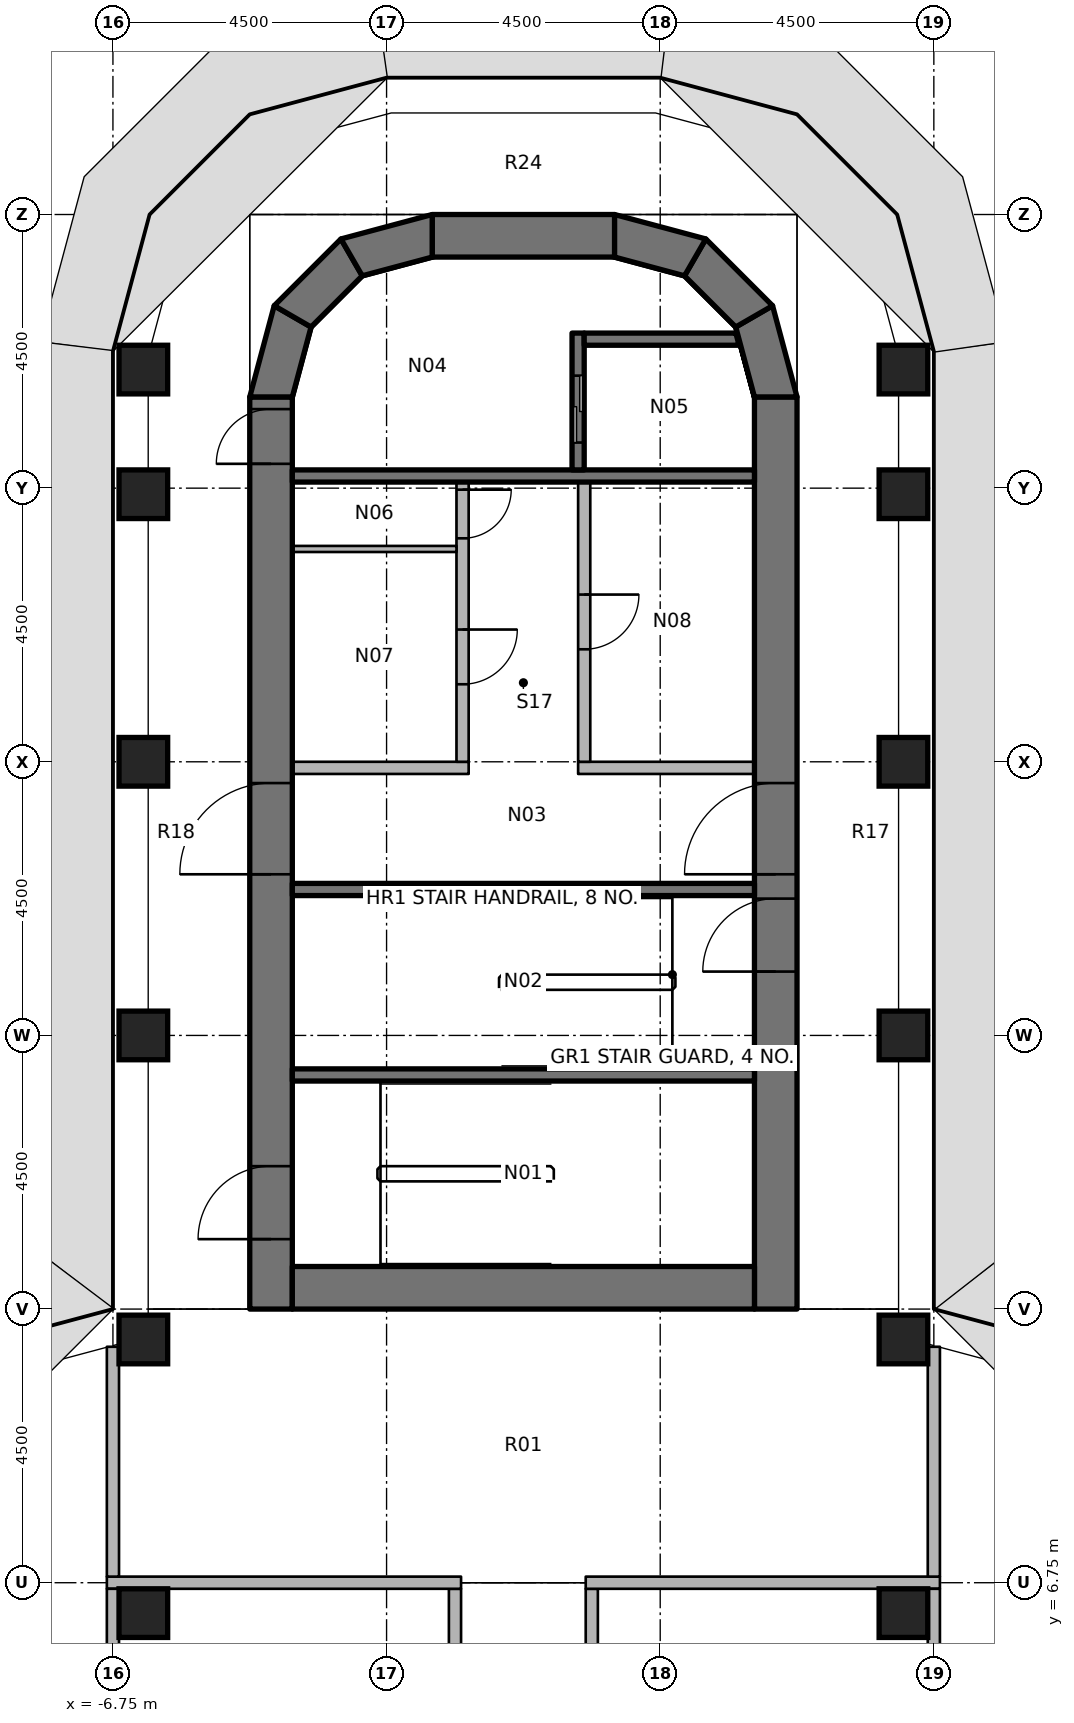
"""IFC4 building model, lengths in metres.
Left out: names, types, materials, properties, quantities, classifications, styles, units other than length and angle.
Written with IfcOpenShell. Run it as: python <this file> out.ifc"""

import sys

from ifc_helpers import new_model, si_unit, direction, frame, frame_2d, origin, origin_2d, place, context, subcontext, project, spatial, polyline, rectangle, outline, extrude, element, fill, save


model = new_model("IFC4")
c1 = context("Model", 3, precision=1e-05, world=origin(), true_north=direction((0.0, 1.0)))
c2 = subcontext(c1, "Body", "Model", "MODEL_VIEW")
j1 = project(units=[si_unit("LENGTHUNIT", "METRE"), si_unit("PLANEANGLEUNIT", "RADIAN")], contexts=[c1])
p1 = place(None, origin())
s1 = spatial("IfcSite", under=j1, at=p1, CompositionType="ELEMENT")
p2 = place(p1, origin())
s2 = spatial("IfcBuilding", under=s1, at=p2, CompositionType="ELEMENT")
p3 = place(p2, frame((0.0, 0.0, 171.4)))
s3 = spatial("IfcBuildingStorey", under=s2, at=p3, CompositionType="ELEMENT", Elevation=171.4)
for number, where, z_axis, x_axis in (
    (1, (-6.25, 6.25, 0.0), (0.0, 0.0, 1.0), (1.0, 0.0, 0.0)),
    (2, (-6.25, 10.75, 0.0), (0.0, 0.0, 1.0), (1.0, 0.0, 0.0)),
    (3, (-6.25, 15.75, 0.0), (0.0, 0.0, 1.0), (1.0, 0.0, 0.0)),
    (4, (-6.25, 20.25, 0.0), (0.0, 0.0, 1.0), (1.0, 0.0, 0.0)),
    (5, (-6.25, 24.65, 0.0), (0.0, 0.0, 1.0), (1.0, 0.0, 0.0)),
    (6, (-6.25, 26.7, 0.0), (0.0, 0.0, 1.0), (1.0, 0.0, 0.0)),
    (7, (6.25, 6.25, 0.0), (0.0, 0.0, 1.0), (1.0, 0.0, 0.0)),
    (8, (6.25, 10.75, 0.0), (0.0, 0.0, 1.0), (1.0, 0.0, 0.0)),
    (9, (6.25, 15.75, 0.0), (0.0, 0.0, 1.0), (1.0, 0.0, 0.0)),
    (10, (6.25, 20.25, 0.0), (0.0, 0.0, 1.0), (1.0, 0.0, 0.0)),
    (11, (6.25, 24.65, 0.0), (0.0, 0.0, 1.0), (1.0, 0.0, 0.0)),
    (12, (6.25, 26.7, 0.0), (0.0, 0.0, 1.0), (1.0, 0.0, 0.0)),
):
    element("IfcColumn", number, at=place(p3, frame(where, z_axis=z_axis, x_axis=x_axis)), inside=s3, PredefinedType="COLUMN", context=c2, shape_type="SweptSolid", body=[
        extrude(rectangle(XDim=0.8, YDim=0.8, at=origin_2d()), origin(), (0.0, 0.0, 1.0), 3.65),
    ])
p4 = place(p3, frame((-4.15, 11.25, 0.0), z_axis=(0.0, 0.0, 1.0), x_axis=(0.0, 1.0, 0.0)))
e13 = element("IfcWall", 13, at=p4, inside=s3, PredefinedType="SHEAR", context=c2, shape_type="SweptSolid", body=[
    extrude(rectangle(XDim=15.0, YDim=0.7, at=frame_2d((7.5, 0.0))), origin(), (0.0, 0.0, 1.0), 3.8),
])
p5 = place(p4, frame((7.15, 0.0, 0.0)))
e14 = element("IfcOpeningElement", 14, at=p5, cuts=e13, PredefinedType="OPENING", context=c2, shape_type="SweptSolid", body=[
    extrude(rectangle(XDim=1.5, YDim=2.3, at=frame_2d((0.75, 1.15))), frame((0.0, 0.36, 0.0), z_axis=(0.0, -1.0, 0.0), x_axis=(1.0, 0.0, 0.0)), (0.0, 0.0, 1.0), 0.72),
])
p6 = place(p4, frame((13.9, 0.0, 0.0)))
e15 = element("IfcOpeningElement", 15, at=p6, cuts=e13, PredefinedType="OPENING", context=c2, shape_type="SweptSolid", body=[
    extrude(rectangle(XDim=0.9, YDim=2.1, at=frame_2d((0.45, 1.05))), frame((0.0, 0.36, 0.0), z_axis=(0.0, -1.0, 0.0), x_axis=(1.0, 0.0, 0.0)), (0.0, 0.0, 1.0), 0.72),
])
p7 = place(p4, frame((1.15, 0.0, 0.0)))
e16 = element("IfcOpeningElement", 16, at=p7, cuts=e13, PredefinedType="OPENING", context=c2, shape_type="SweptSolid", body=[
    extrude(rectangle(XDim=1.2, YDim=2.1, at=frame_2d((0.6, 1.05))), frame((0.0, 0.36, 0.0), z_axis=(0.0, -1.0, 0.0), x_axis=(1.0, 0.0, 0.0)), (0.0, 0.0, 1.0), 0.72),
])
p8 = place(p3, frame((4.15, 11.25, 0.0), z_axis=(0.0, 0.0, 1.0), x_axis=(0.0, 1.0, 0.0)))
e17 = element("IfcWall", 17, at=p8, inside=s3, PredefinedType="SHEAR", context=c2, shape_type="SweptSolid", body=[
    extrude(rectangle(XDim=15.0, YDim=0.7, at=frame_2d((7.5, 0.0))), origin(), (0.0, 0.0, 1.0), 3.8),
])
p9 = place(p8, frame((7.15, 0.0, 0.0)))
e18 = element("IfcOpeningElement", 18, at=p9, cuts=e17, PredefinedType="OPENING", context=c2, shape_type="SweptSolid", body=[
    extrude(rectangle(XDim=1.5, YDim=2.3, at=frame_2d((0.75, 1.15))), frame((0.0, 0.36, 0.0), z_axis=(0.0, -1.0, 0.0), x_axis=(1.0, 0.0, 0.0)), (0.0, 0.0, 1.0), 0.72),
])
p10 = place(p8, frame((5.55, 0.0, 0.0)))
e19 = element("IfcOpeningElement", 19, at=p10, cuts=e17, PredefinedType="OPENING", context=c2, shape_type="SweptSolid", body=[
    extrude(rectangle(XDim=1.2, YDim=2.1, at=frame_2d((0.6, 1.05))), frame((0.0, 0.36, 0.0), z_axis=(0.0, -1.0, 0.0), x_axis=(1.0, 0.0, 0.0)), (0.0, 0.0, 1.0), 0.72),
])
p11 = place(p3, frame((-3.8, 11.6, 0.0), z_axis=(0.0, 0.0, 1.0), x_axis=(1.0, 0.0, 0.0)))
e20 = element("IfcWall", 20, at=p11, inside=s3, PredefinedType="SHEAR", context=c2, shape_type="SweptSolid", body=[
    extrude(rectangle(XDim=7.6, YDim=0.7, at=frame_2d((3.8, 0.0))), origin(), (0.0, 0.0, 1.0), 3.8),
])
p12 = place(p3, frame((-1.5, 28.9, 0.0), z_axis=(0.0, 0.0, 1.0), x_axis=(1.0, 0.0, 0.0)))
e21 = element("IfcWall", 21, at=p12, inside=s3, PredefinedType="SHEAR", context=c2, shape_type="SweptSolid", body=[
    extrude(rectangle(XDim=3.0, YDim=0.7, at=frame_2d((1.5, 0.0))), origin(), (0.0, 0.0, 1.0), 3.8),
])
p13 = place(p3, origin())
e22 = element("IfcWall", 22, at=p13, inside=s3, PredefinedType="SHEAR", context=c2, shape_type="SweptSolid", body=[
    extrude(outline(polyline([(-4.5, 26.25), (-4.098, 27.75), (-3.492, 27.4), (-3.8, 26.25), (-4.5, 26.25)])), origin(), (0.0, 0.0, 1.0), 3.8),
])
p14 = place(p3, origin())
e23 = element("IfcWall", 23, at=p14, inside=s3, PredefinedType="SHEAR", context=c2, shape_type="SweptSolid", body=[
    extrude(outline(polyline([(-4.098, 27.75), (-3.0, 28.848), (-2.65, 28.242), (-3.492, 27.4), (-4.098, 27.75)])), origin(), (0.0, 0.0, 1.0), 3.8),
])
p15 = place(p3, origin())
e24 = element("IfcWall", 24, at=p15, inside=s3, PredefinedType="SHEAR", context=c2, shape_type="SweptSolid", body=[
    extrude(outline(polyline([(-3.0, 28.848), (-1.5, 29.25), (-1.5, 28.55), (-2.65, 28.242), (-3.0, 28.848)])), origin(), (0.0, 0.0, 1.0), 3.8),
])
p16 = place(p3, origin())
e25 = element("IfcWall", 25, at=p16, inside=s3, PredefinedType="SHEAR", context=c2, shape_type="SweptSolid", body=[
    extrude(outline(polyline([(4.5, 26.25), (4.098, 27.75), (3.492, 27.4), (3.8, 26.25), (4.5, 26.25)])), origin(), (0.0, 0.0, 1.0), 3.8),
])
p17 = place(p3, origin())
e26 = element("IfcWall", 26, at=p17, inside=s3, PredefinedType="SHEAR", context=c2, shape_type="SweptSolid", body=[
    extrude(outline(polyline([(4.098, 27.75), (3.0, 28.848), (2.65, 28.242), (3.492, 27.4), (4.098, 27.75)])), origin(), (0.0, 0.0, 1.0), 3.8),
])
p18 = place(p3, origin())
e27 = element("IfcWall", 27, at=p18, inside=s3, PredefinedType="SHEAR", context=c2, shape_type="SweptSolid", body=[
    extrude(outline(polyline([(3.0, 28.848), (1.5, 29.25), (1.5, 28.55), (2.65, 28.242), (3.0, 28.848)])), origin(), (0.0, 0.0, 1.0), 3.8),
])
p19 = place(p3, frame((-3.8, 24.95, 0.0), z_axis=(0.0, 0.0, 1.0), x_axis=(1.0, 0.0, 0.0)))
e28 = element("IfcWall", 28, at=p19, inside=s3, PredefinedType="SHEAR", context=c2, shape_type="SweptSolid", body=[
    extrude(rectangle(XDim=7.6, YDim=0.2, at=frame_2d((3.8, 0.0))), origin(), (0.0, 0.0, 1.0), 3.65),
])
p20 = place(p3, frame((0.9, 27.3, 0.0), z_axis=(0.0, 0.0, 1.0), x_axis=(0.0, -1.0, 0.0)))
e29 = element("IfcWall", 29, at=p20, inside=s3, PredefinedType="SHEAR", context=c2, shape_type="SweptSolid", body=[
    extrude(rectangle(XDim=2.25, YDim=0.2, at=frame_2d((1.125, 0.0))), origin(), (0.0, 0.0, 1.0), 3.65),
])
p21 = place(p20, frame((0.7, 0.0, 0.0)))
e30 = element("IfcOpeningElement", 30, at=p21, cuts=e29, PredefinedType="OPENING", context=c2, shape_type="SweptSolid", body=[
    extrude(rectangle(XDim=1.1, YDim=2.3, at=frame_2d((0.55, 1.15))), frame((0.0, 0.11, 0.0), z_axis=(0.0, -1.0, 0.0), x_axis=(1.0, 0.0, 0.0)), (0.0, 0.0, 1.0), 0.22),
])
p22 = place(p3, origin())
e31 = element("IfcWall", 31, at=p22, inside=s3, PredefinedType="SHEAR", context=c2, shape_type="SweptSolid", body=[
    extrude(outline(polyline([(1.0, 27.1), (3.548, 27.1), (3.494, 27.3), (1.0, 27.3), (1.0, 27.1)])), origin(), (0.0, 0.0, 1.0), 3.65),
])
for number, where, z_axis, x_axis in (
    (32, (-3.8, 18.15, 0.0), (0.0, 0.0, 1.0), (1.0, 0.0, 0.0)),
    (33, (-3.8, 15.1, 0.0), (0.0, 0.0, 1.0), (1.0, 0.0, 0.0)),
):
    element("IfcWall", number, at=place(p3, frame(where, z_axis=z_axis, x_axis=x_axis)), inside=s3, PredefinedType="SHEAR", context=c2, shape_type="SweptSolid", body=[
        extrude(rectangle(XDim=7.6, YDim=0.2, at=frame_2d((3.8, 0.0))), origin(), (0.0, 0.0, 1.0), 3.65),
    ])
p23 = place(p3, frame((-3.8, 20.15, 0.0), z_axis=(0.0, 0.0, 1.0), x_axis=(1.0, 0.0, 0.0)))
e34 = element("IfcWall", 34, at=p23, inside=s3, PredefinedType="PARTITIONING", context=c2, shape_type="SweptSolid", body=[
    extrude(rectangle(XDim=2.9, YDim=0.2, at=frame_2d((1.45, 0.0))), origin(), (0.0, 0.0, 1.0), 3.65),
])
p24 = place(p3, frame((-1.0, 24.85, 0.0), z_axis=(0.0, 0.0, 1.0), x_axis=(0.0, -1.0, 0.0)))
e35 = element("IfcWall", 35, at=p24, inside=s3, PredefinedType="PARTITIONING", context=c2, shape_type="SweptSolid", body=[
    extrude(rectangle(XDim=4.6, YDim=0.2, at=frame_2d((2.3, 0.0))), origin(), (0.0, 0.0, 1.0), 3.65),
])
p25 = place(p24, frame((0.125, 0.0, 0.0)))
e36 = element("IfcOpeningElement", 36, at=p25, cuts=e35, PredefinedType="OPENING", context=c2, shape_type="SweptSolid", body=[
    extrude(rectangle(XDim=0.8, YDim=2.1, at=frame_2d((0.4, 1.05))), frame((0.0, 0.11, 0.0), z_axis=(0.0, -1.0, 0.0), x_axis=(1.0, 0.0, 0.0)), (0.0, 0.0, 1.0), 0.22),
])
p26 = place(p24, frame((2.425, 0.0, 0.0)))
e37 = element("IfcOpeningElement", 37, at=p26, cuts=e35, PredefinedType="OPENING", context=c2, shape_type="SweptSolid", body=[
    extrude(rectangle(XDim=0.9, YDim=2.1, at=frame_2d((0.45, 1.05))), frame((0.0, 0.11, 0.0), z_axis=(0.0, -1.0, 0.0), x_axis=(1.0, 0.0, 0.0)), (0.0, 0.0, 1.0), 0.22),
])
p27 = place(p3, frame((0.9, 20.15, 0.0), z_axis=(0.0, 0.0, 1.0), x_axis=(1.0, 0.0, 0.0)))
e38 = element("IfcWall", 38, at=p27, inside=s3, PredefinedType="PARTITIONING", context=c2, shape_type="SweptSolid", body=[
    extrude(rectangle(XDim=2.9, YDim=0.2, at=frame_2d((1.45, 0.0))), origin(), (0.0, 0.0, 1.0), 3.65),
])
p28 = place(p3, frame((1.0, 24.85, 0.0), z_axis=(0.0, 0.0, 1.0), x_axis=(0.0, -1.0, 0.0)))
e39 = element("IfcWall", 39, at=p28, inside=s3, PredefinedType="PARTITIONING", context=c2, shape_type="SweptSolid", body=[
    extrude(rectangle(XDim=4.6, YDim=0.2, at=frame_2d((2.3, 0.0))), origin(), (0.0, 0.0, 1.0), 3.65),
])
p29 = place(p28, frame((1.85, 0.0, 0.0)))
e40 = element("IfcOpeningElement", 40, at=p29, cuts=e39, PredefinedType="OPENING", context=c2, shape_type="SweptSolid", body=[
    extrude(rectangle(XDim=0.9, YDim=2.1, at=frame_2d((0.45, 1.05))), frame((0.0, 0.11, 0.0), z_axis=(0.0, -1.0, 0.0), x_axis=(1.0, 0.0, 0.0)), (0.0, 0.0, 1.0), 0.22),
])
p30 = place(p3, frame((-3.8, 23.75, 0.0), z_axis=(0.0, 0.0, 1.0), x_axis=(1.0, 0.0, 0.0)))
e41 = element("IfcWall", 41, at=p30, inside=s3, PredefinedType="PARTITIONING", context=c2, shape_type="SweptSolid", body=[
    extrude(rectangle(XDim=2.7, YDim=0.1, at=frame_2d((1.35, 0.0))), origin(), (0.0, 0.0, 1.0), 3.65),
])
for number, where, z_axis, x_axis in (
    (42, (1.125, 1.225, 0.0), (0.0, 0.0, 1.0), (0.0, 1.0, 0.0)),
    (43, (-1.125, 1.225, 0.0), (0.0, 0.0, 1.0), (0.0, 1.0, 0.0)),
):
    element("IfcWall", number, at=place(p3, frame(where, z_axis=z_axis, x_axis=x_axis)), inside=s3, PredefinedType="PARTITIONING", context=c2, shape_type="SweptSolid", body=[
        extrude(rectangle(XDim=5.425, YDim=0.2, at=frame_2d((2.712, 0.0))), origin(), (0.0, 0.0, 1.0), 2.75),
    ])
p31 = place(p3, frame((1.025, 6.75, 0.0), z_axis=(0.0, 0.0, 1.0), x_axis=(1.0, 0.0, 0.0)))
e44 = element("IfcWall", 44, at=p31, inside=s3, PredefinedType="PARTITIONING", context=c2, shape_type="SweptSolid", body=[
    extrude(rectangle(XDim=5.825, YDim=0.2, at=frame_2d((2.913, 0.0))), origin(), (0.0, 0.0, 1.0), 2.75),
])
p32 = place(p3, frame((6.75, 6.85, 0.0), z_axis=(0.0, 0.0, 1.0), x_axis=(0.0, 1.0, 0.0)))
e45 = element("IfcWall", 45, at=p32, inside=s3, PredefinedType="PARTITIONING", context=c2, shape_type="SweptSolid", body=[
    extrude(rectangle(XDim=3.78, YDim=0.2, at=frame_2d((1.89, 0.0))), origin(), (0.0, 0.0, 1.0), 2.75),
])
p33 = place(p3, frame((-6.85, 6.75, 0.0), z_axis=(0.0, 0.0, 1.0), x_axis=(1.0, 0.0, 0.0)))
e46 = element("IfcWall", 46, at=p33, inside=s3, PredefinedType="PARTITIONING", context=c2, shape_type="SweptSolid", body=[
    extrude(rectangle(XDim=5.825, YDim=0.2, at=frame_2d((2.913, 0.0))), origin(), (0.0, 0.0, 1.0), 2.75),
])
p34 = place(p3, frame((-6.75, 6.85, 0.0), z_axis=(0.0, 0.0, 1.0), x_axis=(0.0, 1.0, 0.0)))
e47 = element("IfcWall", 47, at=p34, inside=s3, PredefinedType="PARTITIONING", context=c2, shape_type="SweptSolid", body=[
    extrude(rectangle(XDim=3.78, YDim=0.2, at=frame_2d((1.89, 0.0))), origin(), (0.0, 0.0, 1.0), 2.75),
])
for number, where, z_axis, x_axis in (
    (48, (6.75, 1.225, 0.0), (0.0, 0.0, 1.0), (0.0, 1.0, 0.0)),
    (49, (-6.75, 1.225, 0.0), (0.0, 0.0, 1.0), (0.0, 1.0, 0.0)),
):
    element("IfcWall", number, at=place(p3, frame(where, z_axis=z_axis, x_axis=x_axis)), inside=s3, PredefinedType="PARTITIONING", context=c2, shape_type="SweptSolid", body=[
        extrude(rectangle(XDim=5.425, YDim=0.2, at=frame_2d((2.712, 0.0))), origin(), (0.0, 0.0, 1.0), 2.75),
    ])
p35 = place(p5, origin())
e50 = element("IfcDoor", 50, at=p35, inside=s3, OperationType="DOUBLE_DOOR_SINGLE_SWING", PredefinedType="DOOR", context=c2, shape_type="SweptSolid", body=[
    extrude(rectangle(XDim=1.5, YDim=2.3, at=frame_2d((0.75, 1.15))), frame((0.0, 0.025, 0.0), z_axis=(0.0, -1.0, 0.0), x_axis=(1.0, 0.0, 0.0)), (0.0, 0.0, 1.0), 0.05),
])
fill(e14, e50)
p36 = place(p9, origin())
e51 = element("IfcDoor", 51, at=p36, inside=s3, OperationType="DOUBLE_DOOR_SINGLE_SWING", PredefinedType="DOOR", context=c2, shape_type="SweptSolid", body=[
    extrude(rectangle(XDim=1.5, YDim=2.3, at=frame_2d((0.75, 1.15))), frame((0.0, 0.025, 0.0), z_axis=(0.0, -1.0, 0.0), x_axis=(1.0, 0.0, 0.0)), (0.0, 0.0, 1.0), 0.05),
])
fill(e18, e51)
p37 = place(p6, origin())
e52 = element("IfcDoor", 52, at=p37, inside=s3, OperationType="SINGLE_SWING_LEFT", PredefinedType="DOOR", context=c2, shape_type="SweptSolid", body=[
    extrude(rectangle(XDim=0.9, YDim=2.1, at=frame_2d((0.45, 1.05))), frame((0.0, 0.025, 0.0), z_axis=(0.0, -1.0, 0.0), x_axis=(1.0, 0.0, 0.0)), (0.0, 0.0, 1.0), 0.05),
])
fill(e15, e52)
p38 = place(p10, origin())
e53 = element("IfcDoor", 53, at=p38, inside=s3, OperationType="SINGLE_SWING_RIGHT", PredefinedType="DOOR", context=c2, shape_type="SweptSolid", body=[
    extrude(rectangle(XDim=1.2, YDim=2.1, at=frame_2d((0.6, 1.05))), frame((0.0, 0.025, 0.0), z_axis=(0.0, -1.0, 0.0), x_axis=(1.0, 0.0, 0.0)), (0.0, 0.0, 1.0), 0.05),
])
fill(e19, e53)
p39 = place(p7, origin())
e54 = element("IfcDoor", 54, at=p39, inside=s3, OperationType="SINGLE_SWING_RIGHT", PredefinedType="DOOR", context=c2, shape_type="SweptSolid", body=[
    extrude(rectangle(XDim=1.2, YDim=2.1, at=frame_2d((0.6, 1.05))), frame((0.0, 0.025, 0.0), z_axis=(0.0, -1.0, 0.0), x_axis=(1.0, 0.0, 0.0)), (0.0, 0.0, 1.0), 0.05),
])
fill(e16, e54)
p40 = place(p21, origin())
e55 = element("IfcDoor", 55, at=p40, inside=s3, OperationType="DOUBLE_DOOR_SLIDING", PredefinedType="DOOR", context=c2, shape_type="SweptSolid", body=[
    extrude(rectangle(XDim=1.1, YDim=2.3, at=frame_2d((0.55, 1.15))), frame((0.0, 0.025, 0.0), z_axis=(0.0, -1.0, 0.0), x_axis=(1.0, 0.0, 0.0)), (0.0, 0.0, 1.0), 0.05),
])
fill(e30, e55)
p41 = place(p25, origin())
e56 = element("IfcDoor", 56, at=p41, inside=s3, OperationType="SINGLE_SWING_LEFT", PredefinedType="DOOR", context=c2, shape_type="SweptSolid", body=[
    extrude(rectangle(XDim=0.8, YDim=2.1, at=frame_2d((0.4, 1.05))), frame((0.0, 0.025, 0.0), z_axis=(0.0, -1.0, 0.0), x_axis=(1.0, 0.0, 0.0)), (0.0, 0.0, 1.0), 0.05),
])
fill(e36, e56)
p42 = place(p26, origin())
e57 = element("IfcDoor", 57, at=p42, inside=s3, OperationType="SINGLE_SWING_RIGHT", PredefinedType="DOOR", context=c2, shape_type="SweptSolid", body=[
    extrude(rectangle(XDim=0.9, YDim=2.1, at=frame_2d((0.45, 1.05))), frame((0.0, 0.025, 0.0), z_axis=(0.0, -1.0, 0.0), x_axis=(1.0, 0.0, 0.0)), (0.0, 0.0, 1.0), 0.05),
])
fill(e37, e57)
p43 = place(p29, origin())
e58 = element("IfcDoor", 58, at=p43, inside=s3, OperationType="SINGLE_SWING_RIGHT", PredefinedType="DOOR", context=c2, shape_type="SweptSolid", body=[
    extrude(rectangle(XDim=0.9, YDim=2.1, at=frame_2d((0.45, 1.05))), frame((0.0, 0.025, 0.0), z_axis=(0.0, -1.0, 0.0), x_axis=(1.0, 0.0, 0.0)), (0.0, 0.0, 1.0), 0.05),
])
fill(e40, e58)
save(model, sys.argv[1])
